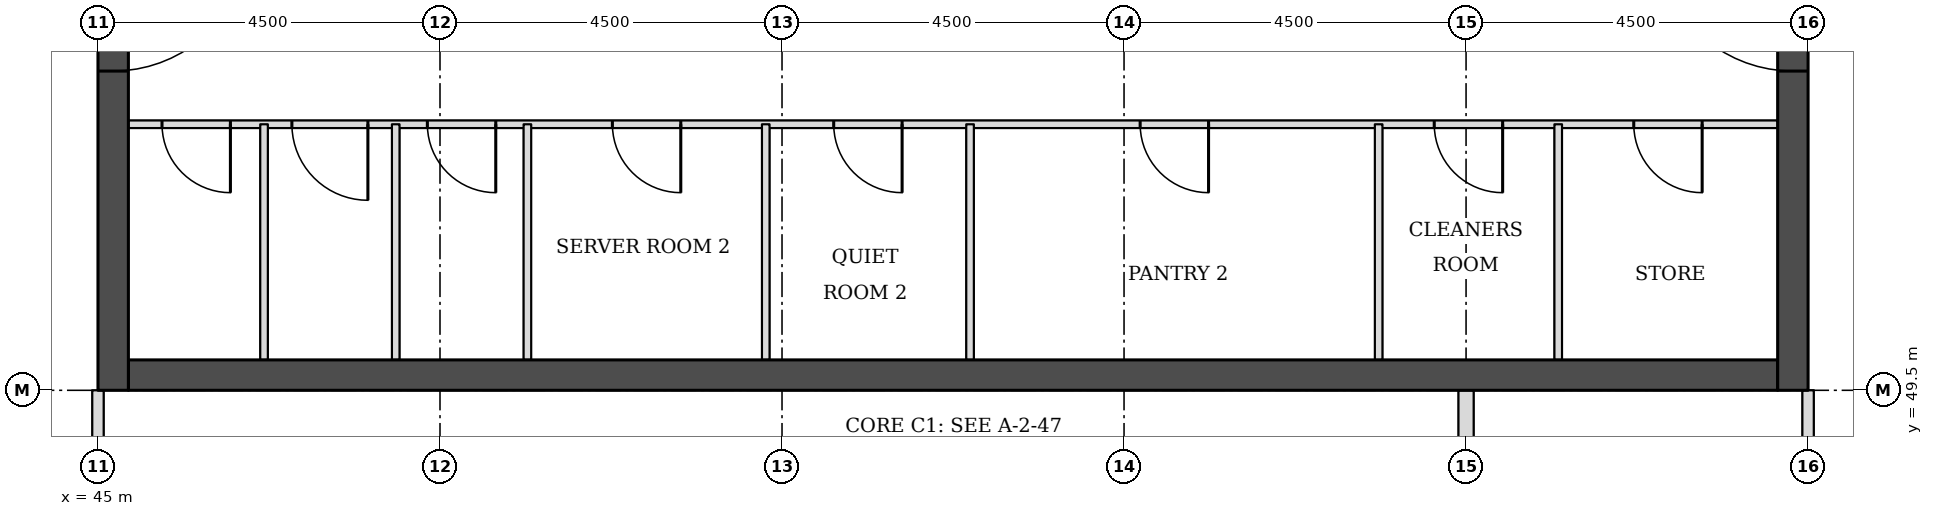
"""IFC4 building model, lengths in metres.
Left out: names, types, materials, properties, quantities, classifications, styles, units other than length and angle.
Written with IfcOpenShell. Run it as: python <this file> out.ifc"""

import sys

from ifc_helpers import new_model, si_unit, direction, frame, frame_2d, origin, place, context, subcontext, project, spatial, rectangle, extrude, element, fill, save


model = new_model("IFC4")
c1 = context("Model", 3, precision=1e-05, world=origin(), true_north=direction((0.0, 1.0)))
c2 = subcontext(c1, "Body", "Model", "MODEL_VIEW")
j1 = project(units=[si_unit("LENGTHUNIT", "METRE"), si_unit("PLANEANGLEUNIT", "RADIAN")], contexts=[c1])
p1 = place(None, origin())
s1 = spatial("IfcSite", under=j1, at=p1, CompositionType="ELEMENT")
p2 = place(p1, origin())
s2 = spatial("IfcBuilding", under=s1, at=p2, CompositionType="ELEMENT")
p3 = place(p2, frame((0.0, 0.0, 188.4)))
s3 = spatial("IfcBuildingStorey", under=s2, at=p3, CompositionType="ELEMENT", Elevation=188.4)
p4 = place(p3, frame((45.4, 49.7, 0.0), z_axis=(0.0, 0.0, 1.0), x_axis=(1.0, 0.0, 0.0)))
e1 = element("IfcWall", 1, at=p4, inside=s3, PredefinedType="SHEAR", context=c2, shape_type="SweptSolid", body=[
    extrude(rectangle(XDim=21.7, YDim=0.4, at=frame_2d((10.85, 0.0))), origin(), (0.0, 0.0, 1.0), 3.7),
])
p5 = place(p3, frame((45.2, 49.5, 0.0), z_axis=(0.0, 0.0, 1.0), x_axis=(0.0, 1.0, 0.0)))
e2 = element("IfcWall", 2, at=p5, inside=s3, PredefinedType="SHEAR", context=c2, shape_type="SweptSolid", body=[
    extrude(rectangle(XDim=22.5, YDim=0.4, at=frame_2d((11.25, 0.0))), origin(), (0.0, 0.0, 1.0), 3.7),
])
p6 = place(p5, frame((4.2, 0.0, 0.0)))
e3 = element("IfcOpeningElement", 3, at=p6, cuts=e2, PredefinedType="OPENING", context=c2, shape_type="SweptSolid", body=[
    extrude(rectangle(XDim=1.8, YDim=2.1, at=frame_2d((0.9, 1.05))), frame((0.0, 0.21, 0.0), z_axis=(0.0, -1.0, 0.0), x_axis=(1.0, 0.0, 0.0)), (0.0, 0.0, 1.0), 0.42),
])
p7 = place(p5, frame((6.9, 0.0, 0.0)))
e4 = element("IfcOpeningElement", 4, at=p7, cuts=e2, PredefinedType="OPENING", context=c2, shape_type="SweptSolid", body=[
    extrude(rectangle(XDim=1.1, YDim=2.1, at=frame_2d((0.55, 1.05))), frame((0.0, 0.21, 0.0), z_axis=(0.0, -1.0, 0.0), x_axis=(1.0, 0.0, 0.0)), (0.0, 0.0, 1.0), 0.42),
])
p8 = place(p5, frame((13.6, 0.0, 0.0)))
e5 = element("IfcOpeningElement", 5, at=p8, cuts=e2, PredefinedType="OPENING", context=c2, shape_type="SweptSolid", body=[
    extrude(rectangle(XDim=1.1, YDim=2.1, at=frame_2d((0.55, 1.05))), frame((0.0, 0.21, 0.0), z_axis=(0.0, -1.0, 0.0), x_axis=(1.0, 0.0, 0.0)), (0.0, 0.0, 1.0), 0.42),
])
p9 = place(p5, frame((16.5, 0.0, 0.0)))
e6 = element("IfcOpeningElement", 6, at=p9, cuts=e2, PredefinedType="OPENING", context=c2, shape_type="SweptSolid", body=[
    extrude(rectangle(XDim=1.8, YDim=2.1, at=frame_2d((0.9, 1.05))), frame((0.0, 0.21, 0.0), z_axis=(0.0, -1.0, 0.0), x_axis=(1.0, 0.0, 0.0)), (0.0, 0.0, 1.0), 0.42),
])
p10 = place(p3, frame((67.3, 49.5, 0.0), z_axis=(0.0, 0.0, 1.0), x_axis=(0.0, 1.0, 0.0)))
e7 = element("IfcWall", 7, at=p10, inside=s3, PredefinedType="SHEAR", context=c2, shape_type="SweptSolid", body=[
    extrude(rectangle(XDim=22.5, YDim=0.4, at=frame_2d((11.25, 0.0))), origin(), (0.0, 0.0, 1.0), 3.7),
])
p11 = place(p10, frame((4.2, 0.0, 0.0)))
e8 = element("IfcOpeningElement", 8, at=p11, cuts=e7, PredefinedType="OPENING", context=c2, shape_type="SweptSolid", body=[
    extrude(rectangle(XDim=1.8, YDim=2.1, at=frame_2d((0.9, 1.05))), frame((0.0, 0.21, 0.0), z_axis=(0.0, -1.0, 0.0), x_axis=(1.0, 0.0, 0.0)), (0.0, 0.0, 1.0), 0.42),
])
p12 = place(p10, frame((6.9, 0.0, 0.0)))
e9 = element("IfcOpeningElement", 9, at=p12, cuts=e7, PredefinedType="OPENING", context=c2, shape_type="SweptSolid", body=[
    extrude(rectangle(XDim=1.1, YDim=2.1, at=frame_2d((0.55, 1.05))), frame((0.0, 0.21, 0.0), z_axis=(0.0, -1.0, 0.0), x_axis=(1.0, 0.0, 0.0)), (0.0, 0.0, 1.0), 0.42),
])
p13 = place(p10, frame((13.6, 0.0, 0.0)))
e10 = element("IfcOpeningElement", 10, at=p13, cuts=e7, PredefinedType="OPENING", context=c2, shape_type="SweptSolid", body=[
    extrude(rectangle(XDim=1.1, YDim=2.1, at=frame_2d((0.55, 1.05))), frame((0.0, 0.21, 0.0), z_axis=(0.0, -1.0, 0.0), x_axis=(1.0, 0.0, 0.0)), (0.0, 0.0, 1.0), 0.42),
])
p14 = place(p10, frame((16.5, 0.0, 0.0)))
e11 = element("IfcOpeningElement", 11, at=p14, cuts=e7, PredefinedType="OPENING", context=c2, shape_type="SweptSolid", body=[
    extrude(rectangle(XDim=1.8, YDim=2.1, at=frame_2d((0.9, 1.05))), frame((0.0, 0.21, 0.0), z_axis=(0.0, -1.0, 0.0), x_axis=(1.0, 0.0, 0.0)), (0.0, 0.0, 1.0), 0.42),
])
p15 = place(p3, frame((67.5, 45.0, 0.0), z_axis=(0.0, 0.0, 1.0), x_axis=(0.0, 1.0, 0.0)))
e12 = element("IfcWall", 12, at=p15, inside=s3, PredefinedType="PARTITIONING", context=c2, shape_type="SweptSolid", body=[
    extrude(rectangle(XDim=4.5, YDim=0.15, at=frame_2d((2.25, 0.0))), origin(), (0.0, 0.0, 1.0), 3.022),
])
p16 = place(p3, frame((63.0, 46.5, 0.0), z_axis=(0.0, 0.0, 1.0), x_axis=(0.0, 1.0, 0.0)))
e13 = element("IfcWall", 13, at=p16, inside=s3, PredefinedType="PARTITIONING", context=c2, shape_type="SweptSolid", body=[
    extrude(rectangle(XDim=3.0, YDim=0.2, at=frame_2d((1.5, 0.0))), origin(), (0.0, 0.0, 1.0), 3.55),
])
p17 = place(p3, frame((45.0, 48.0, 0.0), z_axis=(0.0, 0.0, 1.0), x_axis=(0.0, 1.0, 0.0)))
e14 = element("IfcWall", 14, at=p17, inside=s3, PredefinedType="PARTITIONING", context=c2, shape_type="SweptSolid", body=[
    extrude(rectangle(XDim=1.5, YDim=0.15, at=frame_2d((0.75, 0.0))), origin(), (0.0, 0.0, 1.0), 3.022),
])
p18 = place(p3, frame((45.4, 53.0, 0.0), z_axis=(0.0, 0.0, 1.0), x_axis=(1.0, 0.0, 0.0)))
e15 = element("IfcWall", 15, at=p18, inside=s3, PredefinedType="PARTITIONING", context=c2, shape_type="SweptSolid", body=[
    extrude(rectangle(XDim=21.7, YDim=0.1, at=frame_2d((10.85, 0.0))), origin(), (0.0, 0.0, 1.0), 3.55),
])
p19 = place(p18, frame((19.806, 0.0, 0.0)))
e16 = element("IfcOpeningElement", 16, at=p19, cuts=e15, PredefinedType="OPENING", context=c2, shape_type="SweptSolid", body=[
    extrude(rectangle(XDim=0.9, YDim=2.1, at=frame_2d((0.45, 1.05))), frame((0.0, 0.06, 0.0), z_axis=(0.0, -1.0, 0.0), x_axis=(1.0, 0.0, 0.0)), (0.0, 0.0, 1.0), 0.12),
])
p20 = place(p18, frame((17.181, 0.0, 0.0)))
e17 = element("IfcOpeningElement", 17, at=p20, cuts=e15, PredefinedType="OPENING", context=c2, shape_type="SweptSolid", body=[
    extrude(rectangle(XDim=0.9, YDim=2.1, at=frame_2d((0.45, 1.05))), frame((0.0, 0.06, 0.0), z_axis=(0.0, -1.0, 0.0), x_axis=(1.0, 0.0, 0.0)), (0.0, 0.0, 1.0), 0.12),
])
p21 = place(p18, frame((0.442, 0.0, 0.0)))
e18 = element("IfcOpeningElement", 18, at=p21, cuts=e15, PredefinedType="OPENING", context=c2, shape_type="SweptSolid", body=[
    extrude(rectangle(XDim=0.9, YDim=2.1, at=frame_2d((0.45, 1.05))), frame((0.0, 0.06, 0.0), z_axis=(0.0, -1.0, 0.0), x_axis=(1.0, 0.0, 0.0)), (0.0, 0.0, 1.0), 0.12),
])
p22 = place(p18, frame((2.151, 0.0, 0.0)))
e19 = element("IfcOpeningElement", 19, at=p22, cuts=e15, PredefinedType="OPENING", context=c2, shape_type="SweptSolid", body=[
    extrude(rectangle(XDim=1.0, YDim=2.1, at=frame_2d((0.5, 1.05))), frame((0.0, 0.06, 0.0), z_axis=(0.0, -1.0, 0.0), x_axis=(1.0, 0.0, 0.0)), (0.0, 0.0, 1.0), 0.12),
])
p23 = place(p18, frame((3.934, 0.0, 0.0)))
e20 = element("IfcOpeningElement", 20, at=p23, cuts=e15, PredefinedType="OPENING", context=c2, shape_type="SweptSolid", body=[
    extrude(rectangle(XDim=0.9, YDim=2.1, at=frame_2d((0.45, 1.05))), frame((0.0, 0.06, 0.0), z_axis=(0.0, -1.0, 0.0), x_axis=(1.0, 0.0, 0.0)), (0.0, 0.0, 1.0), 0.12),
])
p24 = place(p18, frame((6.368, 0.0, 0.0)))
e21 = element("IfcOpeningElement", 21, at=p24, cuts=e15, PredefinedType="OPENING", context=c2, shape_type="SweptSolid", body=[
    extrude(rectangle(XDim=0.9, YDim=2.1, at=frame_2d((0.45, 1.05))), frame((0.0, 0.06, 0.0), z_axis=(0.0, -1.0, 0.0), x_axis=(1.0, 0.0, 0.0)), (0.0, 0.0, 1.0), 0.12),
])
p25 = place(p18, frame((9.28, 0.0, 0.0)))
e22 = element("IfcOpeningElement", 22, at=p25, cuts=e15, PredefinedType="OPENING", context=c2, shape_type="SweptSolid", body=[
    extrude(rectangle(XDim=0.9, YDim=2.1, at=frame_2d((0.45, 1.05))), frame((0.0, 0.06, 0.0), z_axis=(0.0, -1.0, 0.0), x_axis=(1.0, 0.0, 0.0)), (0.0, 0.0, 1.0), 0.12),
])
p26 = place(p18, frame((13.312, 0.0, 0.0)))
e23 = element("IfcOpeningElement", 23, at=p26, cuts=e15, PredefinedType="OPENING", context=c2, shape_type="SweptSolid", body=[
    extrude(rectangle(XDim=0.9, YDim=2.1, at=frame_2d((0.45, 1.05))), frame((0.0, 0.06, 0.0), z_axis=(0.0, -1.0, 0.0), x_axis=(1.0, 0.0, 0.0)), (0.0, 0.0, 1.0), 0.12),
])
for number, where, z_axis, x_axis in (
    (24, (47.185, 49.9, 0.0), (0.0, 0.0, 1.0), (0.0, 1.0, 0.0)),
    (25, (48.917, 49.9, 0.0), (0.0, 0.0, 1.0), (0.0, 1.0, 0.0)),
    (26, (50.65, 49.9, 0.0), (0.0, 0.0, 1.0), (0.0, 1.0, 0.0)),
    (27, (53.786, 49.9, 0.0), (0.0, 0.0, 1.0), (0.0, 1.0, 0.0)),
    (28, (56.474, 49.9, 0.0), (0.0, 0.0, 1.0), (0.0, 1.0, 0.0)),
    (29, (61.85, 49.9, 0.0), (0.0, 0.0, 1.0), (0.0, 1.0, 0.0)),
    (30, (64.212, 49.9, 0.0), (0.0, 0.0, 1.0), (0.0, 1.0, 0.0)),
):
    element("IfcWall", number, at=place(p3, frame(where, z_axis=z_axis, x_axis=x_axis)), inside=s3, PredefinedType="PARTITIONING", context=c2, shape_type="SweptSolid", body=[
        extrude(rectangle(XDim=3.1, YDim=0.1, at=frame_2d((1.55, 0.0))), origin(), (0.0, 0.0, 1.0), 3.55),
    ])
p27 = place(p6, frame((1.8, 0.0, 0.0), z_axis=(0.0, 0.0, 1.0), x_axis=(-1.0, 0.0, 0.0)))
e31 = element("IfcDoor", 31, at=p27, inside=s3, OperationType="SINGLE_SWING_LEFT", PredefinedType="DOOR", context=c2, shape_type="SweptSolid", body=[
    extrude(rectangle(XDim=1.8, YDim=2.1, at=frame_2d((0.9, 1.05))), frame((0.0, 0.025, 0.0), z_axis=(0.0, -1.0, 0.0), x_axis=(1.0, 0.0, 0.0)), (0.0, 0.0, 1.0), 0.05),
])
fill(e3, e31)
p28 = place(p11, origin())
e32 = element("IfcDoor", 32, at=p28, inside=s3, OperationType="SINGLE_SWING_RIGHT", PredefinedType="DOOR", context=c2, shape_type="SweptSolid", body=[
    extrude(rectangle(XDim=1.8, YDim=2.1, at=frame_2d((0.9, 1.05))), frame((0.0, 0.025, 0.0), z_axis=(0.0, -1.0, 0.0), x_axis=(1.0, 0.0, 0.0)), (0.0, 0.0, 1.0), 0.05),
])
fill(e8, e32)
p29 = place(p19, frame((0.9, 0.0, 0.0), z_axis=(0.0, 0.0, 1.0), x_axis=(-1.0, 0.0, 0.0)))
e33 = element("IfcDoor", 33, at=p29, inside=s3, OperationType="SINGLE_SWING_LEFT", PredefinedType="DOOR", context=c2, shape_type="SweptSolid", body=[
    extrude(rectangle(XDim=0.9, YDim=2.1, at=frame_2d((0.45, 1.05))), frame((0.0, 0.025, 0.0), z_axis=(0.0, -1.0, 0.0), x_axis=(1.0, 0.0, 0.0)), (0.0, 0.0, 1.0), 0.05),
])
fill(e16, e33)
p30 = place(p20, frame((0.9, 0.0, 0.0), z_axis=(0.0, 0.0, 1.0), x_axis=(-1.0, 0.0, 0.0)))
e34 = element("IfcDoor", 34, at=p30, inside=s3, OperationType="SINGLE_SWING_LEFT", PredefinedType="DOOR", context=c2, shape_type="SweptSolid", body=[
    extrude(rectangle(XDim=0.9, YDim=2.1, at=frame_2d((0.45, 1.05))), frame((0.0, 0.025, 0.0), z_axis=(0.0, -1.0, 0.0), x_axis=(1.0, 0.0, 0.0)), (0.0, 0.0, 1.0), 0.05),
])
fill(e17, e34)
p31 = place(p21, frame((0.9, 0.0, 0.0), z_axis=(0.0, 0.0, 1.0), x_axis=(-1.0, 0.0, 0.0)))
e35 = element("IfcDoor", 35, at=p31, inside=s3, OperationType="SINGLE_SWING_LEFT", PredefinedType="DOOR", context=c2, shape_type="SweptSolid", body=[
    extrude(rectangle(XDim=0.9, YDim=2.1, at=frame_2d((0.45, 1.05))), frame((0.0, 0.025, 0.0), z_axis=(0.0, -1.0, 0.0), x_axis=(1.0, 0.0, 0.0)), (0.0, 0.0, 1.0), 0.05),
])
fill(e18, e35)
p32 = place(p22, frame((1.0, 0.0, 0.0), z_axis=(0.0, 0.0, 1.0), x_axis=(-1.0, 0.0, 0.0)))
e36 = element("IfcDoor", 36, at=p32, inside=s3, OperationType="SINGLE_SWING_LEFT", PredefinedType="DOOR", context=c2, shape_type="SweptSolid", body=[
    extrude(rectangle(XDim=1.0, YDim=2.1, at=frame_2d((0.5, 1.05))), frame((0.0, 0.025, 0.0), z_axis=(0.0, -1.0, 0.0), x_axis=(1.0, 0.0, 0.0)), (0.0, 0.0, 1.0), 0.05),
])
fill(e19, e36)
p33 = place(p23, frame((0.9, 0.0, 0.0), z_axis=(0.0, 0.0, 1.0), x_axis=(-1.0, 0.0, 0.0)))
e37 = element("IfcDoor", 37, at=p33, inside=s3, OperationType="SINGLE_SWING_LEFT", PredefinedType="DOOR", context=c2, shape_type="SweptSolid", body=[
    extrude(rectangle(XDim=0.9, YDim=2.1, at=frame_2d((0.45, 1.05))), frame((0.0, 0.025, 0.0), z_axis=(0.0, -1.0, 0.0), x_axis=(1.0, 0.0, 0.0)), (0.0, 0.0, 1.0), 0.05),
])
fill(e20, e37)
p34 = place(p24, frame((0.9, 0.0, 0.0), z_axis=(0.0, 0.0, 1.0), x_axis=(-1.0, 0.0, 0.0)))
e38 = element("IfcDoor", 38, at=p34, inside=s3, OperationType="SINGLE_SWING_LEFT", PredefinedType="DOOR", context=c2, shape_type="SweptSolid", body=[
    extrude(rectangle(XDim=0.9, YDim=2.1, at=frame_2d((0.45, 1.05))), frame((0.0, 0.025, 0.0), z_axis=(0.0, -1.0, 0.0), x_axis=(1.0, 0.0, 0.0)), (0.0, 0.0, 1.0), 0.05),
])
fill(e21, e38)
p35 = place(p25, frame((0.9, 0.0, 0.0), z_axis=(0.0, 0.0, 1.0), x_axis=(-1.0, 0.0, 0.0)))
e39 = element("IfcDoor", 39, at=p35, inside=s3, OperationType="SINGLE_SWING_LEFT", PredefinedType="DOOR", context=c2, shape_type="SweptSolid", body=[
    extrude(rectangle(XDim=0.9, YDim=2.1, at=frame_2d((0.45, 1.05))), frame((0.0, 0.025, 0.0), z_axis=(0.0, -1.0, 0.0), x_axis=(1.0, 0.0, 0.0)), (0.0, 0.0, 1.0), 0.05),
])
fill(e22, e39)
p36 = place(p26, frame((0.9, 0.0, 0.0), z_axis=(0.0, 0.0, 1.0), x_axis=(-1.0, 0.0, 0.0)))
e40 = element("IfcDoor", 40, at=p36, inside=s3, OperationType="SINGLE_SWING_LEFT", PredefinedType="DOOR", context=c2, shape_type="SweptSolid", body=[
    extrude(rectangle(XDim=0.9, YDim=2.1, at=frame_2d((0.45, 1.05))), frame((0.0, 0.025, 0.0), z_axis=(0.0, -1.0, 0.0), x_axis=(1.0, 0.0, 0.0)), (0.0, 0.0, 1.0), 0.05),
])
fill(e23, e40)
save(model, sys.argv[1])
